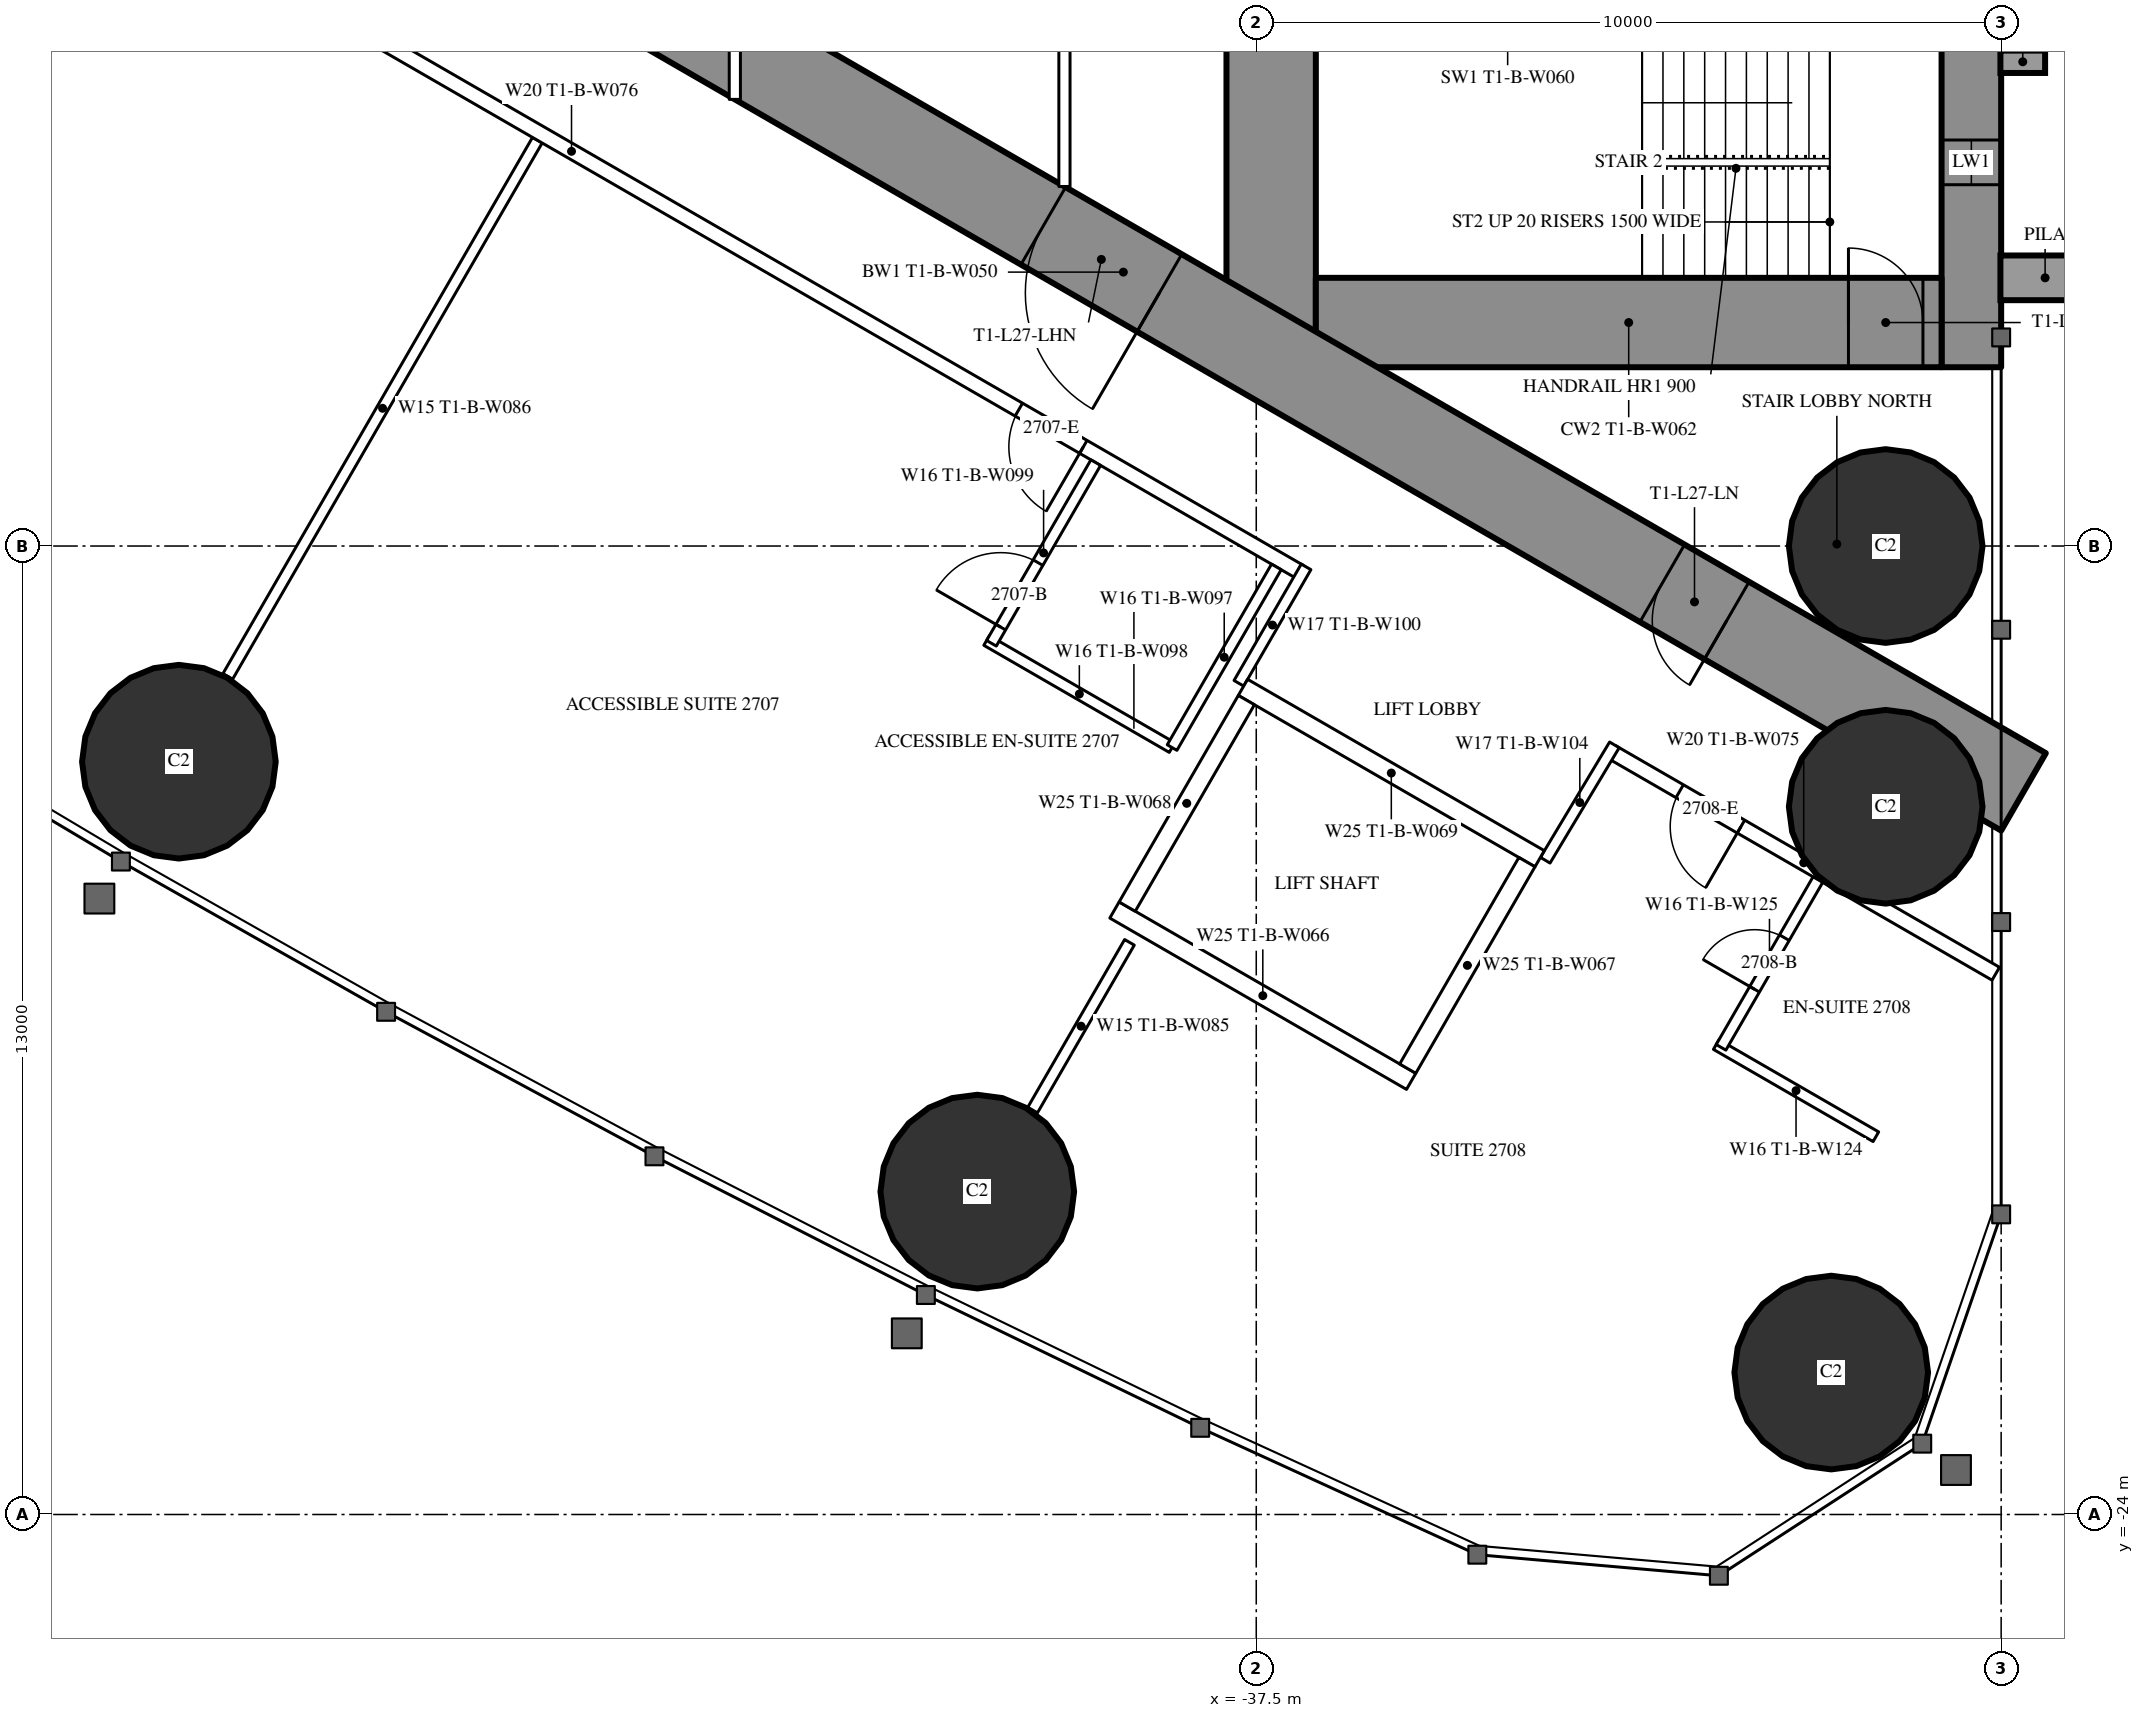
"""IFC4 building model, lengths in metres.
Left out: names, types, materials, properties, quantities, classifications, styles, units other than length and angle.
Written with IfcOpenShell. Run it as: python <this file> out.ifc"""

import sys

from ifc_helpers import new_model, si_unit, direction, frame, frame_2d, origin, origin_2d, place, context, subcontext, project, spatial, rectangle, hollow_circle, extrude, element, fill, save


model = new_model("IFC4")
c1 = context("Model", 3, precision=1e-05, world=origin(), true_north=direction((0.0, 1.0)))
c2 = subcontext(c1, "Body", "Model", "MODEL_VIEW")
j1 = project(units=[si_unit("LENGTHUNIT", "METRE"), si_unit("PLANEANGLEUNIT", "RADIAN")], contexts=[c1])
p1 = place(None, origin())
s1 = spatial("IfcSite", under=j1, at=p1, CompositionType="ELEMENT")
p2 = place(p1, origin())
s2 = spatial("IfcBuilding", under=s1, at=p2, CompositionType="ELEMENT")
p3 = place(p2, frame((0.0, 0.0, 104.6)))
s3 = spatial("IfcBuildingStorey", under=s2, at=p3, CompositionType="ELEMENT", Elevation=104.6)
for number, where, z_axis, x_axis in (
    (1, (-29.781, -22.095, 0.0), (0.0, 0.0, 1.0), (1.0, 0.0, 0.0)),
    (2, (-29.05, -11.0, 0.0), (0.0, 0.0, 1.0), (1.0, 0.0, 0.0)),
    (3, (-29.05, -14.5, 0.0), (0.0, 0.0, 1.0), (1.0, 0.0, 0.0)),
    (4, (-51.963, -13.895, 0.0), (0.0, 0.0, 1.0), (1.0, 0.0, 0.0)),
    (5, (-41.245, -19.666, 0.0), (0.0, 0.0, 1.0), (1.0, 0.0, 0.0)),
):
    element("IfcColumn", number, at=place(p3, frame(where, z_axis=z_axis, x_axis=x_axis)), inside=s3, PredefinedType="COLUMN", context=c2, shape_type="SweptSolid", body=[
        extrude(hollow_circle(Radius=1.3, WallThickness=0.1, at=origin_2d()), origin(), (0.0, 0.0, 1.0), 3.5),
    ])
p4 = place(p3, frame((-27.9, 8.6, 0.0), z_axis=(0.0, 0.0, 1.0), x_axis=(0.0, -1.0, 0.0)))
e6 = element("IfcWall", 6, at=p4, inside=s3, PredefinedType="SHEAR", context=c2, shape_type="SweptSolid", body=[
    extrude(rectangle(XDim=17.2, YDim=0.8, at=frame_2d((8.6, 0.0))), origin(), (0.0, 0.0, 1.0), 3.5),
])
p5 = place(p4, frame((2.45, 0.0, 0.6)))
e7 = element("IfcOpeningElement", 7, at=p5, cuts=e6, PredefinedType="OPENING", context=c2, shape_type="SweptSolid", body=[
    extrude(rectangle(XDim=0.6, YDim=2.1, at=frame_2d((0.3, 1.05))), frame((0.0, 0.41, 0.0), z_axis=(0.0, -1.0, 0.0), x_axis=(1.0, 0.0, 0.0)), (0.0, 0.0, 1.0), 0.82),
])
p6 = place(p4, frame((14.15, 0.0, 0.6)))
e8 = element("IfcOpeningElement", 8, at=p6, cuts=e6, PredefinedType="OPENING", context=c2, shape_type="SweptSolid", body=[
    extrude(rectangle(XDim=0.6, YDim=2.1, at=frame_2d((0.3, 1.05))), frame((0.0, 0.41, 0.0), z_axis=(0.0, -1.0, 0.0), x_axis=(1.0, 0.0, 0.0)), (0.0, 0.0, 1.0), 0.82),
])
p7 = place(p3, frame((-37.3, 8.6, 0.0), z_axis=(0.0, 0.0, 1.0), x_axis=(0.0, -1.0, 0.0)))
e9 = element("IfcWall", 9, at=p7, inside=s3, PredefinedType="SHEAR", context=c2, shape_type="SweptSolid", body=[
    extrude(rectangle(XDim=17.2, YDim=1.2, at=frame_2d((8.6, 0.0))), origin(), (0.0, 0.0, 1.0), 3.5),
])
p8 = place(p7, frame((7.7, 0.0, 0.0)))
e10 = element("IfcOpeningElement", 10, at=p8, cuts=e9, PredefinedType="OPENING", context=c2, shape_type="SweptSolid", body=[
    extrude(rectangle(XDim=1.8, YDim=2.2, at=frame_2d((0.9, 1.1))), frame((0.0, 0.61, 0.0), z_axis=(0.0, -1.0, 0.0), x_axis=(1.0, 0.0, 0.0)), (0.0, 0.0, 1.0), 1.22),
])
p9 = place(p3, frame((-28.3, -8.0, 0.0), z_axis=(0.0, 0.0, 1.0), x_axis=(-1.0, 0.0, 0.0)))
e11 = element("IfcWall", 11, at=p9, inside=s3, PredefinedType="SHEAR", context=c2, shape_type="SweptSolid", body=[
    extrude(rectangle(XDim=8.4, YDim=1.2, at=frame_2d((4.2, 0.0))), origin(), (0.0, 0.0, 1.0), 3.5),
])
p10 = place(p9, frame((0.25, 0.0, 0.0)))
e12 = element("IfcOpeningElement", 12, at=p10, cuts=e11, PredefinedType="OPENING", context=c2, shape_type="SweptSolid", body=[
    extrude(rectangle(XDim=1.0, YDim=2.2, at=frame_2d((0.5, 1.1))), frame((0.0, 0.61, 0.0), z_axis=(0.0, -1.0, 0.0), x_axis=(1.0, 0.0, 0.0)), (0.0, 0.0, 1.0), 1.22),
])
p11 = place(p3, frame((-27.2, -14.3, 0.0), z_axis=(0.0, 0.0, 1.0), x_axis=(-0.866024021859, 0.500002393557, 0.0)))
e13 = element("IfcWall", 13, at=p11, inside=s3, PredefinedType="SHEAR", context=c2, shape_type="SweptSolid", body=[
    extrude(rectangle(XDim=27.907, YDim=1.2, at=frame_2d((13.954, 0.0))), origin(), (0.0, 0.0, 1.0), 3.5),
])
p12 = place(p11, frame((4.6, 0.0, 0.0)))
e14 = element("IfcOpeningElement", 14, at=p12, cuts=e13, PredefinedType="OPENING", context=c2, shape_type="SweptSolid", body=[
    extrude(rectangle(XDim=1.0, YDim=2.2, at=frame_2d((0.5, 1.1))), frame((0.0, 0.61, 0.0), z_axis=(0.0, -1.0, 0.0), x_axis=(1.0, 0.0, 0.0)), (0.0, 0.0, 1.0), 1.22),
])
p13 = place(p11, frame((13.395, 0.0, 0.0)))
e15 = element("IfcOpeningElement", 15, at=p13, cuts=e13, PredefinedType="OPENING", context=c2, shape_type="SweptSolid", body=[
    extrude(rectangle(XDim=1.8, YDim=2.2, at=frame_2d((0.9, 1.1))), frame((0.0, 0.61, 0.0), z_axis=(0.0, -1.0, 0.0), x_axis=(1.0, 0.0, 0.0)), (0.0, 0.0, 1.0), 1.22),
])
p14 = place(p3, frame((-47.151, -5.552, 0.0), z_axis=(0.0, 0.0, 1.0), x_axis=(-0.500003012045, -0.866023664773, 0.0)))
e16 = element("IfcWall", 16, at=p14, inside=s3, PredefinedType="PARTITIONING", context=c2, shape_type="SweptSolid", body=[
    extrude(rectangle(XDim=8.311, YDim=0.15, at=frame_2d((4.156, 0.0))), origin(), (0.0, 0.0, 1.0), 2.2),
])
p15 = place(p3, frame((-39.202, -16.32, 0.0), z_axis=(0.0, 0.0, 1.0), x_axis=(-0.49997716683, -0.86603858612, 0.0)))
e17 = element("IfcWall", 17, at=p15, inside=s3, PredefinedType="PARTITIONING", context=c2, shape_type="SweptSolid", body=[
    extrude(rectangle(XDim=2.6, YDim=0.15, at=frame_2d((1.3, 0.0))), origin(), (0.0, 0.0, 1.0), 3.25),
])
p16 = place(p3, frame((-27.572, -16.741, 0.0), z_axis=(0.0, 0.0, 1.0), x_axis=(-0.866024464444, 0.500001626982, 0.0)))
e18 = element("IfcWall", 18, at=p16, inside=s3, PredefinedType="PARTITIONING", context=c2, shape_type="SweptSolid", body=[
    extrude(rectangle(XDim=5.955, YDim=0.2, at=frame_2d((2.978, 0.0))), origin(), (0.0, 0.0, 1.0), 3.25),
])
p17 = place(p16, frame((3.95, 0.0, 0.0)))
e19 = element("IfcOpeningElement", 19, at=p17, cuts=e18, PredefinedType="OPENING", context=c2, shape_type="SweptSolid", body=[
    extrude(rectangle(XDim=0.95, YDim=2.2, at=frame_2d((0.475, 1.1))), frame((0.0, 0.11, 0.0), z_axis=(0.0, -1.0, 0.0), x_axis=(1.0, 0.0, 0.0)), (0.0, 0.0, 1.0), 0.22),
])
p18 = place(p3, frame((-36.92, -11.344, 0.0), z_axis=(0.0, 0.0, 1.0), x_axis=(-0.866028313256, 0.499994960614, 0.0)))
e20 = element("IfcWall", 20, at=p18, inside=s3, PredefinedType="PARTITIONING", context=c2, shape_type="SweptSolid", body=[
    extrude(rectangle(XDim=22.568, YDim=0.2, at=frame_2d((11.284, 0.0))), origin(), (0.0, 0.0, 1.0), 3.25),
])
p19 = place(p18, frame((21.018, 0.0, 0.0)))
e21 = element("IfcOpeningElement", 21, at=p19, cuts=e20, PredefinedType="OPENING", context=c2, shape_type="SweptSolid", body=[
    extrude(rectangle(XDim=0.95, YDim=2.2, at=frame_2d((0.475, 1.1))), frame((0.0, 0.11, 0.0), z_axis=(0.0, -1.0, 0.0), x_axis=(1.0, 0.0, 0.0)), (0.0, 0.0, 1.0), 0.22),
])
p20 = place(p18, frame((3.35, 0.0, 0.0)))
e22 = element("IfcOpeningElement", 22, at=p20, cuts=e20, PredefinedType="OPENING", context=c2, shape_type="SweptSolid", body=[
    extrude(rectangle(XDim=1.0, YDim=2.2, at=frame_2d((0.5, 1.1))), frame((0.0, 0.11, 0.0), z_axis=(0.0, -1.0, 0.0), x_axis=(1.0, 0.0, 0.0)), (0.0, 0.0, 1.0), 0.22),
])
p21 = place(p3, frame((-36.831, -11.28, 0.0), z_axis=(0.0, 0.0, 1.0), x_axis=(-0.499937177781, -0.866061671171, 0.0)))
e23 = element("IfcWall", 23, at=p21, inside=s3, PredefinedType="PARTITIONING", context=c2, shape_type="SweptSolid", body=[
    extrude(rectangle(XDim=1.804, YDim=0.15, at=frame_2d((0.902, 0.0))), origin(), (0.0, 0.0, 1.0), 3.25),
])
p22 = place(p3, frame((-33.621, -15.218, 0.0), z_axis=(0.0, 0.0, 1.0), x_axis=(0.514336634837, 0.857588377991, 0.0)))
e24 = element("IfcWall", 24, at=p22, inside=s3, PredefinedType="PARTITIONING", context=c2, shape_type="SweptSolid", body=[
    extrude(rectangle(XDim=1.805, YDim=0.15, at=frame_2d((0.903, 0.0))), origin(), (0.0, 0.0, 1.0), 3.25),
])
p23 = place(p3, frame((-38.63, -13.705, 0.0), z_axis=(0.0, 0.0, 1.0), x_axis=(-0.866018712932, 0.500011588718, 0.0)))
e25 = element("IfcWall", 25, at=p23, inside=s3, PredefinedType="PARTITIONING", context=c2, shape_type="SweptSolid", body=[
    extrude(rectangle(XDim=2.875, YDim=0.15, at=frame_2d((1.438, 0.0))), origin(), (0.0, 0.0, 1.0), 3.25),
])
p24 = place(p3, frame((-39.655, -9.88, 0.0), z_axis=(0.0, 0.0, 1.0), x_axis=(-0.500049511043, -0.865996816683, 0.0)))
e26 = element("IfcWall", 26, at=p24, inside=s3, PredefinedType="PARTITIONING", context=c2, shape_type="SweptSolid", body=[
    extrude(rectangle(XDim=2.8, YDim=0.15, at=frame_2d((1.4, 0.0))), origin(), (0.0, 0.0, 1.0), 3.25),
])
p25 = place(p24, frame((1.55, 0.0, 0.0)))
e27 = element("IfcOpeningElement", 27, at=p25, cuts=e26, PredefinedType="OPENING", context=c2, shape_type="SweptSolid", body=[
    extrude(rectangle(XDim=1.0, YDim=2.2, at=frame_2d((0.5, 1.1))), frame((0.0, 0.085, 0.0), z_axis=(0.0, -1.0, 0.0), x_axis=(1.0, 0.0, 0.0)), (0.0, 0.0, 1.0), 0.17),
])
p26 = place(p3, frame((-37.23, -11.281, 0.0), z_axis=(0.0, 0.0, 1.0), x_axis=(-0.500049511043, -0.865996816683, 0.0)))
e28 = element("IfcWall", 28, at=p26, inside=s3, PredefinedType="PARTITIONING", context=c2, shape_type="SweptSolid", body=[
    extrude(rectangle(XDim=2.8, YDim=0.15, at=frame_2d((1.4, 0.0))), origin(), (0.0, 0.0, 1.0), 3.25),
])
p27 = place(p3, frame((-29.182, -18.929, 0.0), z_axis=(0.0, 0.0, 1.0), x_axis=(-0.866006523861, 0.500032699561, 0.0)))
e29 = element("IfcWall", 29, at=p27, inside=s3, PredefinedType="PARTITIONING", context=c2, shape_type="SweptSolid", body=[
    extrude(rectangle(XDim=2.475, YDim=0.15, at=frame_2d((1.237, 0.0))), origin(), (0.0, 0.0, 1.0), 3.25),
])
p28 = place(p3, frame((-29.96, -15.478, 0.0), z_axis=(0.0, 0.0, 1.0), x_axis=(-0.500006934395, -0.866021400173, 0.0)))
e30 = element("IfcWall", 30, at=p28, inside=s3, PredefinedType="PARTITIONING", context=c2, shape_type="SweptSolid", body=[
    extrude(rectangle(XDim=2.6, YDim=0.15, at=frame_2d((1.3, 0.0))), origin(), (0.0, 0.0, 1.0), 3.25),
])
p29 = place(p28, frame((0.9, 0.0, 0.0)))
e31 = element("IfcOpeningElement", 31, at=p29, cuts=e30, PredefinedType="OPENING", context=c2, shape_type="SweptSolid", body=[
    extrude(rectangle(XDim=0.8, YDim=2.2, at=frame_2d((0.4, 1.1))), frame((0.0, 0.085, 0.0), z_axis=(0.0, -1.0, 0.0), x_axis=(1.0, 0.0, 0.0)), (0.0, 0.0, 1.0), 0.17),
])
p30 = place(p3, frame((-40.075, 1.2, 0.0), z_axis=(0.0, 0.0, 1.0), x_axis=(0.0, -1.0, 0.0)))
e32 = element("IfcWall", 32, at=p30, inside=s3, PredefinedType="PARTITIONING", context=c2, shape_type="SweptSolid", body=[
    extrude(rectangle(XDim=7.374, YDim=0.15, at=frame_2d((3.687, 0.0))), origin(), (0.0, 0.0, 1.0), 3.25),
])
p31 = place(p30, frame((2.787, 0.0, 0.0)))
e33 = element("IfcOpeningElement", 33, at=p31, cuts=e32, PredefinedType="OPENING", context=c2, shape_type="SweptSolid", body=[
    extrude(rectangle(XDim=1.8, YDim=2.2, at=frame_2d((0.9, 1.1))), frame((0.0, 0.085, 0.0), z_axis=(0.0, -1.0, 0.0), x_axis=(1.0, 0.0, 0.0)), (0.0, 0.0, 1.0), 0.17),
])
p32 = place(p3, frame((-44.5, 5.005, 0.0), z_axis=(0.0, 0.0, 1.0), x_axis=(0.0, -1.0, 0.0)))
e34 = element("IfcWall", 34, at=p32, inside=s3, PredefinedType="PARTITIONING", context=c2, shape_type="SweptSolid", body=[
    extrude(rectangle(XDim=10.009, YDim=0.15, at=frame_2d((5.005, 0.0))), origin(), (0.0, 0.0, 1.0), 2.45),
])
p33 = place(p32, frame((4.505, 0.0, 0.0)))
e35 = element("IfcOpeningElement", 35, at=p33, cuts=e34, PredefinedType="OPENING", context=c2, shape_type="SweptSolid", body=[
    extrude(rectangle(XDim=1.0, YDim=2.2, at=frame_2d((0.5, 1.1))), frame((0.0, 0.085, 0.0), z_axis=(0.0, -1.0, 0.0), x_axis=(1.0, 0.0, 0.0)), (0.0, 0.0, 1.0), 0.17),
])
p34 = place(p3, frame((-33.696, -15.197, 0.0), z_axis=(0.0, 0.0, 1.0), x_axis=(-0.865976953817, 0.500083908417, 0.0)))
e36 = element("IfcWall", 36, at=p34, inside=s3, PredefinedType="PARTITIONING", context=c2, shape_type="SweptSolid", body=[
    extrude(rectangle(XDim=4.599, YDim=0.25, at=frame_2d((2.3, 0.0))), origin(), (0.0, 0.0, 1.0), 3.25),
])
p35 = place(p3, frame((-35.42, -18.186, 0.0), z_axis=(0.0, 0.0, 1.0), x_axis=(-0.865990227814, 0.50006092162, 0.0)))
e37 = element("IfcWall", 37, at=p35, inside=s3, PredefinedType="PARTITIONING", context=c2, shape_type="SweptSolid", body=[
    extrude(rectangle(XDim=4.6, YDim=0.25, at=frame_2d((2.3, 0.0))), origin(), (0.0, 0.0, 1.0), 3.25),
])
p36 = place(p3, frame((-33.866, -15.243, 0.0), z_axis=(0.0, 0.0, 1.0), x_axis=(-0.499929347863, -0.866066190972, 0.0)))
e38 = element("IfcWall", 38, at=p36, inside=s3, PredefinedType="PARTITIONING", context=c2, shape_type="SweptSolid", body=[
    extrude(rectangle(XDim=3.201, YDim=0.25, at=frame_2d((1.6, 0.0))), origin(), (0.0, 0.0, 1.0), 3.25),
])
p37 = place(p3, frame((-37.633, -13.068, 0.0), z_axis=(0.0, 0.0, 1.0), x_axis=(-0.499872130319, -0.866099216793, 0.0)))
e39 = element("IfcWall", 39, at=p37, inside=s3, PredefinedType="PARTITIONING", context=c2, shape_type="SweptSolid", body=[
    extrude(rectangle(XDim=3.2, YDim=0.25, at=frame_2d((1.6, 0.0))), origin(), (0.0, 0.0, 1.0), 3.25),
])
p38 = place(p25, origin())
e40 = element("IfcDoor", 40, at=p38, inside=s3, OperationType="SINGLE_SWING_RIGHT", PredefinedType="DOOR", context=c2, shape_type="SweptSolid", body=[
    extrude(rectangle(XDim=1.0, YDim=2.2, at=frame_2d((0.5, 1.1))), frame((0.0, 0.025, 0.0), z_axis=(0.0, -1.0, 0.0), x_axis=(1.0, 0.0, 0.0)), (0.0, 0.0, 1.0), 0.05),
])
fill(e27, e40)
p39 = place(p20, origin())
e41 = element("IfcDoor", 41, at=p39, inside=s3, OperationType="SINGLE_SWING_LEFT", PredefinedType="DOOR", context=c2, shape_type="SweptSolid", body=[
    extrude(rectangle(XDim=1.0, YDim=2.2, at=frame_2d((0.5, 1.1))), frame((0.0, 0.025, 0.0), z_axis=(0.0, -1.0, 0.0), x_axis=(1.0, 0.0, 0.0)), (0.0, 0.0, 1.0), 0.05),
])
fill(e22, e41)
p40 = place(p29, origin())
e42 = element("IfcDoor", 42, at=p40, inside=s3, OperationType="SINGLE_SWING_RIGHT", PredefinedType="DOOR", context=c2, shape_type="SweptSolid", body=[
    extrude(rectangle(XDim=0.8, YDim=2.2, at=frame_2d((0.4, 1.1))), frame((0.0, 0.025, 0.0), z_axis=(0.0, -1.0, 0.0), x_axis=(1.0, 0.0, 0.0)), (0.0, 0.0, 1.0), 0.05),
])
fill(e31, e42)
p41 = place(p17, origin())
e43 = element("IfcDoor", 43, at=p41, inside=s3, OperationType="SINGLE_SWING_LEFT", PredefinedType="DOOR", context=c2, shape_type="SweptSolid", body=[
    extrude(rectangle(XDim=0.95, YDim=2.2, at=frame_2d((0.475, 1.1))), frame((0.0, 0.025, 0.0), z_axis=(0.0, -1.0, 0.0), x_axis=(1.0, 0.0, 0.0)), (0.0, 0.0, 1.0), 0.05),
])
fill(e19, e43)
p42 = place(p12, origin())
e44 = element("IfcDoor", 44, at=p42, inside=s3, OperationType="SINGLE_SWING_LEFT", PredefinedType="DOOR", context=c2, shape_type="SweptSolid", body=[
    extrude(rectangle(XDim=1.0, YDim=2.2, at=frame_2d((0.5, 1.1))), frame((0.0, 0.025, 0.0), z_axis=(0.0, -1.0, 0.0), x_axis=(1.0, 0.0, 0.0)), (0.0, 0.0, 1.0), 0.05),
])
fill(e14, e44)
p43 = place(p13, origin())
e45 = element("IfcDoor", 45, at=p43, inside=s3, OperationType="DOUBLE_DOOR_SINGLE_SWING", PredefinedType="DOOR", context=c2, shape_type="SweptSolid", body=[
    extrude(rectangle(XDim=1.8, YDim=2.2, at=frame_2d((0.9, 1.1))), frame((0.0, 0.025, 0.0), z_axis=(0.0, -1.0, 0.0), x_axis=(1.0, 0.0, 0.0)), (0.0, 0.0, 1.0), 0.05),
])
fill(e15, e45)
p44 = place(p10, origin())
e46 = element("IfcDoor", 46, at=p44, inside=s3, OperationType="SINGLE_SWING_RIGHT", PredefinedType="DOOR", context=c2, shape_type="SweptSolid", body=[
    extrude(rectangle(XDim=1.0, YDim=2.2, at=frame_2d((0.5, 1.1))), frame((0.0, 0.025, 0.0), z_axis=(0.0, -1.0, 0.0), x_axis=(1.0, 0.0, 0.0)), (0.0, 0.0, 1.0), 0.05),
])
fill(e12, e46)
p45 = place(p6, origin())
e47 = element("IfcWindow", 47, at=p45, inside=s3, PartitioningType="SINGLE_PANEL", PredefinedType="WINDOW", context=c2, shape_type="SweptSolid", body=[
    extrude(rectangle(XDim=0.6, YDim=2.1, at=frame_2d((0.3, 1.05))), frame((0.0, 0.03, 0.0), z_axis=(0.0, -1.0, 0.0), x_axis=(1.0, 0.0, 0.0)), (0.0, 0.0, 1.0), 0.06),
])
fill(e8, e47)
save(model, sys.argv[1])
